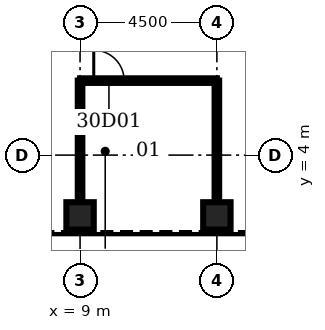
"""IFC4 building model, lengths in metres.
Left out: names, types, materials, properties, quantities, classifications, styles, units other than length and angle.
Written with IfcOpenShell. Run it as: python <this file> out.ifc"""

import sys

from ifc_helpers import new_model, si_unit, direction, frame, frame_2d, origin, origin_2d, place, context, subcontext, project, spatial, rectangle, hollow_rectangle, extrude, element, fill, save


model = new_model("IFC4")
c1 = context("Model", 3, precision=1e-05, world=origin(), true_north=direction((0.0, 1.0)))
c2 = subcontext(c1, "Body", "Model", "MODEL_VIEW")
j1 = project(units=[si_unit("LENGTHUNIT", "METRE"), si_unit("PLANEANGLEUNIT", "RADIAN")], contexts=[c1])
p1 = place(None, origin())
s1 = spatial("IfcSite", under=j1, at=p1, CompositionType="ELEMENT")
p2 = place(p1, origin())
s2 = spatial("IfcBuilding", under=s1, at=p2, CompositionType="ELEMENT")
p3 = place(p2, frame((0.0, 0.0, 138.3)))
s3 = spatial("IfcBuildingStorey", under=s2, at=p3, CompositionType="ELEMENT", Elevation=138.3)
for number, where, z_axis, x_axis in (
    (1, (9.0, 2.0, 0.0), (0.0, 0.0, 1.0), (0.0, 1.0, 0.0)),
    (2, (13.5, 2.0, 0.0), (0.0, 0.0, 1.0), (0.0, 1.0, 0.0)),
):
    element("IfcColumn", number, at=place(p3, frame(where, z_axis=z_axis, x_axis=x_axis)), inside=s3, PredefinedType="COLUMN", context=c2, shape_type="SweptSolid", body=[
        extrude(hollow_rectangle(XDim=0.9, YDim=0.9, WallThickness=0.1, at=origin_2d()), origin(), (0.0, 0.0, 1.0), 4.2),
    ])
p4 = place(p3, frame((9.0, 6.45, 0.0), z_axis=(0.0, 0.0, 1.0), x_axis=(1.0, 0.0, 0.0)))
e3 = element("IfcWall", 3, at=p4, inside=s3, PredefinedType="PARTITIONING", context=c2, shape_type="SweptSolid", body=[
    extrude(rectangle(XDim=4.5, YDim=0.15, at=frame_2d((2.25, 0.0))), origin(), (0.0, 0.0, 1.0), 3.0),
])
p5 = place(p4, frame((0.45, 0.0, 0.0)))
e4 = element("IfcOpeningElement", 4, at=p5, cuts=e3, PredefinedType="OPENING", context=c2, shape_type="SweptSolid", body=[
    extrude(rectangle(XDim=1.0, YDim=2.1, at=frame_2d((0.5, 1.05))), frame((0.0, 0.085, 0.0), z_axis=(0.0, -1.0, 0.0), x_axis=(1.0, 0.0, 0.0)), (0.0, 0.0, 1.0), 0.17),
])
for number, where, z_axis, x_axis in (
    (5, (9.0, 2.45, 0.0), (0.0, 0.0, 1.0), (0.0, 1.0, 0.0)),
    (6, (13.5, 2.45, 0.0), (0.0, 0.0, 1.0), (0.0, 1.0, 0.0)),
):
    element("IfcWall", number, at=place(p3, frame(where, z_axis=z_axis, x_axis=x_axis)), inside=s3, PredefinedType="PARTITIONING", context=c2, shape_type="SweptSolid", body=[
        extrude(rectangle(XDim=4.0, YDim=0.15, at=frame_2d((2.0, 0.0))), origin(), (0.0, 0.0, 1.0), 3.0),
    ])
p6 = place(p5, origin())
e7 = element("IfcDoor", 7, at=p6, inside=s3, OperationType="SINGLE_SWING_LEFT", PredefinedType="DOOR", context=c2, shape_type="SweptSolid", body=[
    extrude(rectangle(XDim=1.0, YDim=2.1, at=frame_2d((0.5, 1.05))), frame((0.0, 0.025, 0.0), z_axis=(0.0, -1.0, 0.0), x_axis=(1.0, 0.0, 0.0)), (0.0, 0.0, 1.0), 0.05),
])
fill(e4, e7)
save(model, sys.argv[1])
